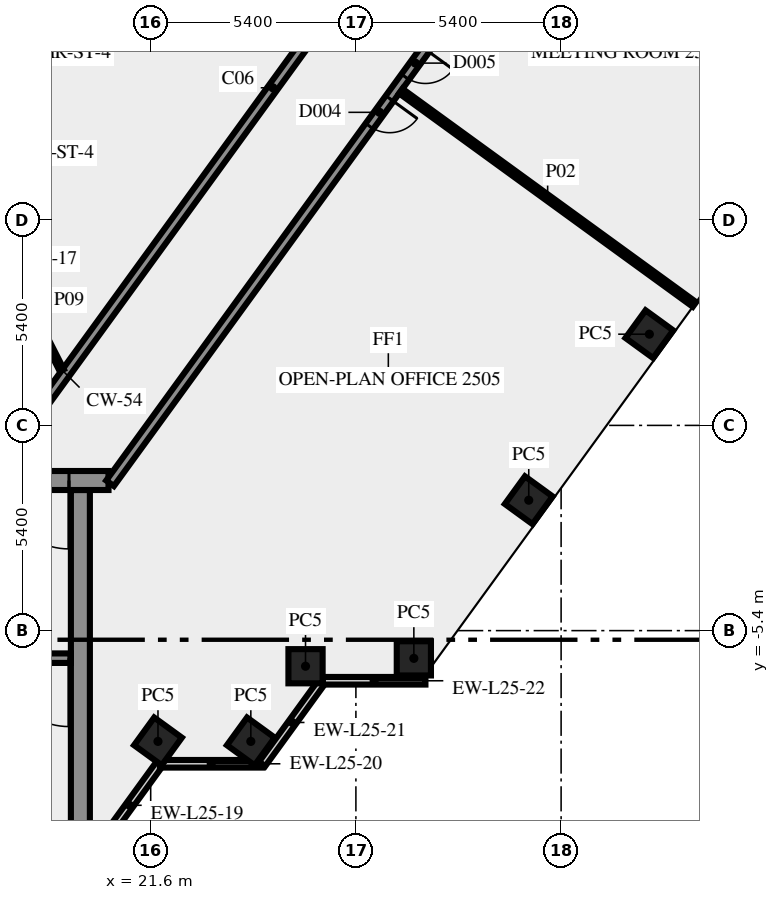
"""IFC4 building model, lengths in metres.
Left out: names, types, materials, properties, quantities, classifications, styles, units other than length and angle.
Written with IfcOpenShell. Run it as: python <this file> out.ifc"""

import sys

from ifc_helpers import new_model, si_unit, direction, frame, frame_2d, origin, origin_2d, place, context, subcontext, project, spatial, rectangle, extrude, element, fill, save


model = new_model("IFC4")
c1 = context("Model", 3, precision=1e-05, world=origin(), true_north=direction((0.0, 1.0)))
c2 = subcontext(c1, "Body", "Model", "MODEL_VIEW")
j1 = project(units=[si_unit("LENGTHUNIT", "METRE"), si_unit("PLANEANGLEUNIT", "RADIAN")], contexts=[c1])
p1 = place(None, origin())
s1 = spatial("IfcSite", under=j1, at=p1, CompositionType="ELEMENT")
p2 = place(p1, origin())
s2 = spatial("IfcBuilding", under=s1, at=p2, CompositionType="ELEMENT")
p3 = place(p2, frame((0.0, 0.0, 109.0)))
s3 = spatial("IfcBuildingStorey", under=s2, at=p3, CompositionType="ELEMENT", Elevation=109.0)
for number, where, z_axis, x_axis in (
    (1, (21.792, -8.315, 0.0), (0.0, 0.0, 1.0), (0.588, 0.809, 0.0)),
    (2, (24.235, -8.315, 0.0), (0.0, 0.0, 1.0), (0.588, 0.809, 0.0)),
    (3, (25.674, -6.337, 0.0), (0.0, 0.0, 1.0), (1.0, 0.0, 0.0)),
    (4, (28.525, -6.13, 0.0), (0.0, 0.0, 1.0), (1.0, 0.0, 0.0)),
    (5, (31.548, -1.969, 0.0), (0.0, 0.0, 1.0), (0.588, 0.809, 0.0)),
    (6, (34.722, 2.4, 0.0), (0.0, 0.0, 1.0), (0.588, 0.809, 0.0)),
):
    element("IfcColumn", number, at=place(p3, frame(where, z_axis=z_axis, x_axis=x_axis)), inside=s3, PredefinedType="COLUMN", context=c2, shape_type="SweptSolid", body=[
        extrude(rectangle(XDim=0.9, YDim=0.9, at=origin_2d()), origin(), (0.0, 0.0, 1.0), 3.65),
    ])
p4 = place(p3, frame((20.253, -11.083, 0.0), z_axis=(0.0, 0.0, 1.0), x_axis=(0.587766567315, 0.809030569476, 0.0)))
e7 = element("IfcWall", 7, at=p4, inside=s3, PredefinedType="SOLIDWALL", context=c2, shape_type="SweptSolid", body=[
    extrude(rectangle(XDim=2.688, YDim=0.2, at=frame_2d((1.344, 0.0))), origin(), (0.0, 0.0, 1.0), 3.65),
])
p5 = place(p3, frame((21.843, -8.904, 0.0), z_axis=(0.0, 0.0, 1.0), x_axis=(1.0, 0.0, 0.0)))
e8 = element("IfcWall", 8, at=p5, inside=s3, PredefinedType="SOLIDWALL", context=c2, shape_type="SweptSolid", body=[
    extrude(rectangle(XDim=2.7, YDim=0.2, at=frame_2d((1.35, 0.0))), origin(), (0.0, 0.0, 1.0), 3.65),
])
p6 = place(p3, frame((24.533, -8.909, 0.0), z_axis=(0.0, 0.0, 1.0), x_axis=(0.587720002413, 0.809064397168, 0.0)))
e9 = element("IfcWall", 9, at=p6, inside=s3, PredefinedType="SOLIDWALL", context=c2, shape_type="SweptSolid", body=[
    extrude(rectangle(XDim=2.7, YDim=0.2, at=frame_2d((1.35, 0.0))), origin(), (0.0, 0.0, 1.0), 3.65),
])
p7 = place(p3, frame((26.13, -6.719, 0.0), z_axis=(0.0, 0.0, 1.0), x_axis=(1.0, 0.0, 0.0)))
e10 = element("IfcWall", 10, at=p7, inside=s3, PredefinedType="SOLIDWALL", context=c2, shape_type="SweptSolid", body=[
    extrude(rectangle(XDim=2.7, YDim=0.2, at=frame_2d((1.35, 0.0))), origin(), (0.0, 0.0, 1.0), 3.65),
])
p8 = place(p3, frame((19.75, -10.5, 0.0), z_axis=(0.0, 0.0, 1.0), x_axis=(0.0, 1.0, 0.0)))
e11 = element("IfcWall", 11, at=p8, inside=s3, PredefinedType="SHEAR", context=c2, shape_type="SweptSolid", body=[
    extrude(rectangle(XDim=8.8, YDim=0.5, at=frame_2d((4.4, 0.0))), origin(), (0.0, 0.0, 1.0), 3.65),
])
p9 = place(p3, frame((19.5, -6.125, 0.0), z_axis=(0.0, 0.0, 1.0), x_axis=(-1.0, 0.0, 0.0)))
e12 = element("IfcWall", 12, at=p9, inside=s3, PredefinedType="SHEAR", context=c2, shape_type="SweptSolid", body=[
    extrude(rectangle(XDim=8.05, YDim=0.25, at=frame_2d((4.025, 0.0))), origin(), (0.0, 0.0, 1.0), 3.65),
])
p10 = place(p9, frame((0.05, 0.0, 0.0)))
e13 = element("IfcOpeningElement", 13, at=p10, cuts=e12, PredefinedType="OPENING", context=c2, shape_type="SweptSolid", body=[
    extrude(rectangle(XDim=1.8, YDim=2.1, at=frame_2d((0.9, 1.05))), frame((0.0, 0.135, 0.0), z_axis=(0.0, -1.0, 0.0), x_axis=(1.0, 0.0, 0.0)), (0.0, 0.0, 1.0), 0.27),
])
p11 = place(p3, frame((20.49, -1.45, 0.0), z_axis=(0.0, 0.0, 1.0), x_axis=(-1.0, 0.0, 0.0)))
e14 = element("IfcWall", 14, at=p11, inside=s3, PredefinedType="SHEAR", context=c2, shape_type="SweptSolid", body=[
    extrude(rectangle(XDim=40.98, YDim=0.5, at=frame_2d((20.49, 0.0))), origin(), (0.0, 0.0, 1.0), 3.65),
])
p12 = place(p11, frame((38.14, 0.0, 0.0)))
e15 = element("IfcOpeningElement", 15, at=p12, cuts=e14, PredefinedType="OPENING", context=c2, shape_type="SweptSolid", body=[
    extrude(rectangle(XDim=1.8, YDim=2.1, at=frame_2d((0.9, 1.05))), frame((0.0, 0.26, 0.0), z_axis=(0.0, -1.0, 0.0), x_axis=(1.0, 0.0, 0.0)), (0.0, 0.0, 1.0), 0.52),
])
p13 = place(p11, frame((36.728, 0.0, 0.0)))
e16 = element("IfcOpeningElement", 16, at=p13, cuts=e14, PredefinedType="OPENING", context=c2, shape_type="SweptSolid", body=[
    extrude(rectangle(XDim=0.8, YDim=2.1, at=frame_2d((0.4, 1.05))), frame((0.0, 0.26, 0.0), z_axis=(0.0, -1.0, 0.0), x_axis=(1.0, 0.0, 0.0)), (0.0, 0.0, 1.0), 0.52),
])
p14 = place(p11, frame((35.153, 0.0, 0.0)))
e17 = element("IfcOpeningElement", 17, at=p14, cuts=e14, PredefinedType="OPENING", context=c2, shape_type="SweptSolid", body=[
    extrude(rectangle(XDim=0.8, YDim=2.1, at=frame_2d((0.4, 1.05))), frame((0.0, 0.26, 0.0), z_axis=(0.0, -1.0, 0.0), x_axis=(1.0, 0.0, 0.0)), (0.0, 0.0, 1.0), 0.52),
])
p15 = place(p11, frame((32.94, 0.0, 0.0)))
e18 = element("IfcOpeningElement", 18, at=p15, cuts=e14, PredefinedType="OPENING", context=c2, shape_type="SweptSolid", body=[
    extrude(rectangle(XDim=0.9, YDim=2.1, at=frame_2d((0.45, 1.05))), frame((0.0, 0.26, 0.0), z_axis=(0.0, -1.0, 0.0), x_axis=(1.0, 0.0, 0.0)), (0.0, 0.0, 1.0), 0.52),
])
p16 = place(p11, frame((21.765, 0.0, 0.0)))
e19 = element("IfcOpeningElement", 19, at=p16, cuts=e14, PredefinedType="OPENING", context=c2, shape_type="SweptSolid", body=[
    extrude(rectangle(XDim=2.0, YDim=2.1, at=frame_2d((1.0, 1.05))), frame((0.0, 0.26, 0.0), z_axis=(0.0, -1.0, 0.0), x_axis=(1.0, 0.0, 0.0)), (0.0, 0.0, 1.0), 0.52),
])
p17 = place(p11, frame((7.14, 0.0, 0.0)))
e20 = element("IfcOpeningElement", 20, at=p17, cuts=e14, PredefinedType="OPENING", context=c2, shape_type="SweptSolid", body=[
    extrude(rectangle(XDim=0.9, YDim=2.1, at=frame_2d((0.45, 1.05))), frame((0.0, 0.26, 0.0), z_axis=(0.0, -1.0, 0.0), x_axis=(1.0, 0.0, 0.0)), (0.0, 0.0, 1.0), 0.52),
])
p18 = place(p11, frame((4.19, 0.0, 0.0)))
e21 = element("IfcOpeningElement", 21, at=p18, cuts=e14, PredefinedType="OPENING", context=c2, shape_type="SweptSolid", body=[
    extrude(rectangle(XDim=0.9, YDim=2.1, at=frame_2d((0.45, 1.05))), frame((0.0, 0.26, 0.0), z_axis=(0.0, -1.0, 0.0), x_axis=(1.0, 0.0, 0.0)), (0.0, 0.0, 1.0), 0.52),
])
p19 = place(p11, frame((1.04, 0.0, 0.0)))
e22 = element("IfcOpeningElement", 22, at=p19, cuts=e14, PredefinedType="OPENING", context=c2, shape_type="SweptSolid", body=[
    extrude(rectangle(XDim=1.8, YDim=2.1, at=frame_2d((0.9, 1.05))), frame((0.0, 0.26, 0.0), z_axis=(0.0, -1.0, 0.0), x_axis=(1.0, 0.0, 0.0)), (0.0, 0.0, 1.0), 0.52),
])
p20 = place(p3, frame((40.463, 25.911, 0.0), z_axis=(0.0, 0.0, 1.0), x_axis=(-0.587781654618, -0.809019608226, 0.0)))
e23 = element("IfcWall", 23, at=p20, inside=s3, PredefinedType="SOLIDWALL", context=c2, shape_type="SweptSolid", body=[
    extrude(rectangle(XDim=33.911, YDim=0.25, at=frame_2d((16.956, 0.0))), origin(), (0.0, 0.0, 1.0), 3.65),
])
p21 = place(p20, frame((21.396, 0.0, 0.0)))
e24 = element("IfcOpeningElement", 24, at=p21, cuts=e23, PredefinedType="OPENING", context=c2, shape_type="SweptSolid", body=[
    extrude(rectangle(XDim=0.9, YDim=2.1, at=frame_2d((0.45, 1.05))), frame((0.0, 0.135, 0.0), z_axis=(0.0, -1.0, 0.0), x_axis=(1.0, 0.0, 0.0)), (0.0, 0.0, 1.0), 0.27),
])
p22 = place(p20, frame((19.795, 0.0, 0.0)))
e25 = element("IfcOpeningElement", 25, at=p22, cuts=e23, PredefinedType="OPENING", context=c2, shape_type="SweptSolid", body=[
    extrude(rectangle(XDim=0.9, YDim=2.1, at=frame_2d((0.45, 1.05))), frame((0.0, 0.135, 0.0), z_axis=(0.0, -1.0, 0.0), x_axis=(1.0, 0.0, 0.0)), (0.0, 0.0, 1.0), 0.27),
])
p23 = place(p3, frame((17.545, -1.125, 0.0), z_axis=(0.0, 0.0, 1.0), x_axis=(0.587788021768, 0.809014982226, 0.0)))
e26 = element("IfcWall", 26, at=p23, inside=s3, PredefinedType="SOLIDWALL", context=c2, shape_type="SweptSolid", body=[
    extrude(rectangle(XDim=35.344, YDim=0.25, at=frame_2d((17.672, 0.0))), origin(), (0.0, 0.0, 1.0), 3.65),
])
p24 = place(p23, frame((17.508, 0.0, 0.0)))
e27 = element("IfcOpeningElement", 27, at=p24, cuts=e26, PredefinedType="OPENING", context=c2, shape_type="SweptSolid", body=[
    extrude(rectangle(XDim=0.9, YDim=2.1, at=frame_2d((0.45, 1.05))), frame((0.0, 0.135, 0.0), z_axis=(0.0, -1.0, 0.0), x_axis=(1.0, 0.0, 0.0)), (0.0, 0.0, 1.0), 0.27),
])
p25 = place(p23, frame((21.808, 0.0, 0.0)))
e28 = element("IfcOpeningElement", 28, at=p25, cuts=e26, PredefinedType="OPENING", context=c2, shape_type="SweptSolid", body=[
    extrude(rectangle(XDim=0.9, YDim=2.1, at=frame_2d((0.45, 1.05))), frame((0.0, 0.135, 0.0), z_axis=(0.0, -1.0, 0.0), x_axis=(1.0, 0.0, 0.0)), (0.0, 0.0, 1.0), 0.27),
])
p26 = place(p23, frame((19.108, 0.0, 0.0)))
e29 = element("IfcOpeningElement", 29, at=p26, cuts=e26, PredefinedType="OPENING", context=c2, shape_type="SweptSolid", body=[
    extrude(rectangle(XDim=0.9, YDim=2.1, at=frame_2d((0.45, 1.05))), frame((0.0, 0.135, 0.0), z_axis=(0.0, -1.0, 0.0), x_axis=(1.0, 0.0, 0.0)), (0.0, 0.0, 1.0), 0.27),
])
p27 = place(p3, frame((35.909, 3.183, 0.0), z_axis=(0.0, 0.0, 1.0), x_axis=(-0.809045492695, 0.587746025721, 0.0)))
e30 = element("IfcWall", 30, at=p27, inside=s3, PredefinedType="PARTITIONING", context=c2, shape_type="SweptSolid", body=[
    extrude(rectangle(XDim=9.551, YDim=0.15, at=frame_2d((4.775, 0.0))), origin(), (0.0, 0.0, 1.0), 2.75),
])
p28 = place(p3, frame((18.0, 3.925, 0.0), z_axis=(0.0, 0.0, 1.0), x_axis=(0.453950796792, -0.891026752736, 0.0)))
e31 = element("IfcWall", 31, at=p28, inside=s3, PredefinedType="PARTITIONING", context=c2, shape_type="SweptSolid", body=[
    extrude(rectangle(XDim=2.778, YDim=0.12, at=frame_2d((1.389, 0.0))), origin(), (0.0, 0.0, 1.0), 3.65),
])
p29 = place(p10, origin())
e32 = element("IfcDoor", 32, at=p29, inside=s3, OperationType="DOUBLE_DOOR_SINGLE_SWING", PredefinedType="DOOR", context=c2, shape_type="SweptSolid", body=[
    extrude(rectangle(XDim=1.8, YDim=2.1, at=frame_2d((0.9, 1.05))), frame((0.0, 0.025, 0.0), z_axis=(0.0, -1.0, 0.0), x_axis=(1.0, 0.0, 0.0)), (0.0, 0.0, 1.0), 0.05),
])
fill(e13, e32)
p30 = place(p19, origin())
e33 = element("IfcDoor", 33, at=p30, inside=s3, OperationType="DOUBLE_DOOR_SINGLE_SWING", PredefinedType="DOOR", context=c2, shape_type="SweptSolid", body=[
    extrude(rectangle(XDim=1.8, YDim=2.1, at=frame_2d((0.9, 1.05))), frame((0.0, 0.025, 0.0), z_axis=(0.0, -1.0, 0.0), x_axis=(1.0, 0.0, 0.0)), (0.0, 0.0, 1.0), 0.05),
])
fill(e22, e33)
p31 = place(p21, origin())
e34 = element("IfcDoor", 34, at=p31, inside=s3, OperationType="SINGLE_SWING_LEFT", PredefinedType="DOOR", context=c2, shape_type="SweptSolid", body=[
    extrude(rectangle(XDim=0.9, YDim=2.1, at=frame_2d((0.45, 1.05))), frame((0.0, 0.025, 0.0), z_axis=(0.0, -1.0, 0.0), x_axis=(1.0, 0.0, 0.0)), (0.0, 0.0, 1.0), 0.05),
])
fill(e24, e34)
p32 = place(p22, origin())
e35 = element("IfcDoor", 35, at=p32, inside=s3, OperationType="SINGLE_SWING_RIGHT", PredefinedType="DOOR", context=c2, shape_type="SweptSolid", body=[
    extrude(rectangle(XDim=0.9, YDim=2.1, at=frame_2d((0.45, 1.05))), frame((0.0, 0.025, 0.0), z_axis=(0.0, -1.0, 0.0), x_axis=(1.0, 0.0, 0.0)), (0.0, 0.0, 1.0), 0.05),
])
fill(e25, e35)
save(model, sys.argv[1])
